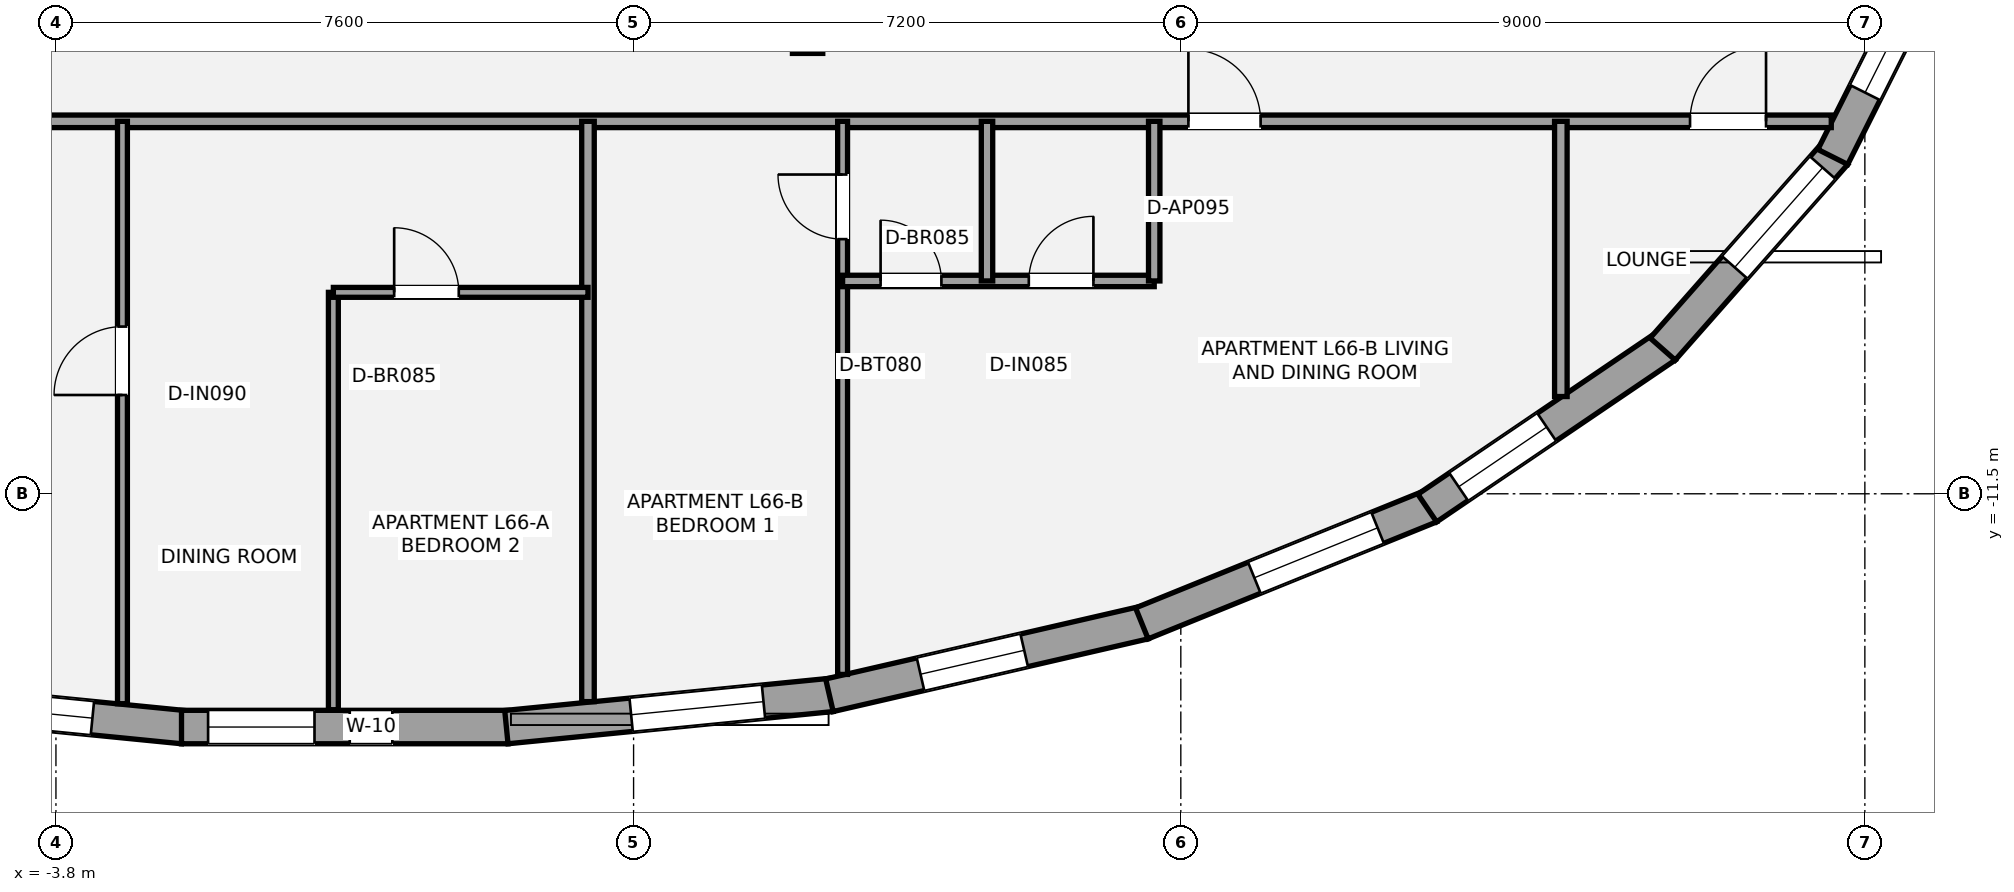
"""IFC4 building model, lengths in metres.
Left out: names, types, materials, properties, quantities, classifications, styles, units other than length and angle.
Written with IfcOpenShell. Run it as: python <this file> out.ifc"""

import sys

from ifc_helpers import new_model, si_unit, direction, frame, frame_2d, origin, origin_2d, place, context, subcontext, project, spatial, rectangle, i_section, extrude, element, fill, save


model = new_model("IFC4")
c1 = context("Model", 3, precision=1e-05, world=origin(), true_north=direction((0.0, 1.0)))
c2 = subcontext(c1, "Body", "Model", "MODEL_VIEW")
j1 = project(units=[si_unit("LENGTHUNIT", "METRE"), si_unit("PLANEANGLEUNIT", "RADIAN")], contexts=[c1])
p1 = place(None, origin())
s1 = spatial("IfcSite", under=j1, at=p1, CompositionType="ELEMENT")
p2 = place(p1, origin())
s2 = spatial("IfcBuilding", under=s1, at=p2, CompositionType="ELEMENT")
p3 = place(p2, frame((0.0, 0.0, 235.2)))
s3 = spatial("IfcBuildingStorey", under=s2, at=p3, CompositionType="ELEMENT", Elevation=235.2)
p4 = place(p3, frame((6.09, -5.513, 0.0), z_axis=(0.0, 0.0, 1.0), x_axis=(1.0, 0.0, 0.0)))
e1 = element("IfcColumn", 1, at=p4, inside=s3, PredefinedType="COLUMN", context=c2, shape_type="SweptSolid", body=[
    extrude(i_section(OverallWidth=0.399, OverallDepth=0.387, WebThickness=0.021, FlangeThickness=0.033, at=origin_2d()), origin(), (0.0, 0.0, 1.0), 3.15),
])
p5 = place(p3, frame((-2.126, -14.57, 0.0), z_axis=(0.0, 0.0, 1.0), x_axis=(-0.995134540264, 0.098525361068, 0.0)))
e2 = element("IfcWall", 2, at=p5, inside=s3, PredefinedType="STANDARD", context=c2, shape_type="SweptSolid", body=[
    extrude(rectangle(XDim=4.299, YDim=0.44, at=frame_2d((2.15, 0.0))), origin(), (0.0, 0.0, 1.0), 2.336),
])
p6 = place(p5, frame((1.2, 0.0, 0.58)))
e3 = element("IfcOpeningElement", 3, at=p6, cuts=e2, PredefinedType="OPENING", context=c2, shape_type="SweptSolid", body=[
    extrude(rectangle(XDim=1.4, YDim=1.55, at=frame_2d((0.7, 0.775))), frame((0.0, 0.23, 0.0), z_axis=(0.0, -1.0, 0.0), x_axis=(1.0, 0.0, 0.0)), (0.0, 0.0, 1.0), 0.46),
])
p7 = place(p3, frame((2.148, -14.569, 0.0), z_axis=(0.0, 0.0, 1.0), x_axis=(-1.0, 0.0, 0.0)))
e4 = element("IfcWall", 4, at=p7, inside=s3, PredefinedType="STANDARD", context=c2, shape_type="SweptSolid", body=[
    extrude(rectangle(XDim=4.296, YDim=0.44, at=frame_2d((2.148, 0.0))), origin(), (0.0, 0.0, 1.0), 2.336),
])
p8 = place(p7, frame((2.546, 0.0, 0.58)))
e5 = element("IfcOpeningElement", 5, at=p8, cuts=e4, PredefinedType="OPENING", context=c2, shape_type="SweptSolid", body=[
    extrude(rectangle(XDim=1.4, YDim=1.55, at=frame_2d((0.7, 0.775))), frame((0.0, 0.23, 0.0), z_axis=(0.0, -1.0, 0.0), x_axis=(1.0, 0.0, 0.0)), (0.0, 0.0, 1.0), 0.46),
])
p9 = place(p7, frame((1.522, 0.0, 0.58)))
e6 = element("IfcOpeningElement", 6, at=p9, cuts=e4, PredefinedType="OPENING", context=c2, shape_type="SweptSolid", body=[
    extrude(rectangle(XDim=0.56, YDim=1.15, at=frame_2d((0.28, 0.575))), frame((0.0, 0.23, 0.0), z_axis=(0.0, -1.0, 0.0), x_axis=(1.0, 0.0, 0.0)), (0.0, 0.0, 1.0), 0.46),
])
p10 = place(p3, frame((6.405, -14.146, 0.0), z_axis=(0.0, 0.0, 1.0), x_axis=(-0.995134540264, -0.098525361068, 0.0)))
e7 = element("IfcWall", 7, at=p10, inside=s3, PredefinedType="STANDARD", context=c2, shape_type="SweptSolid", body=[
    extrude(rectangle(XDim=4.299, YDim=0.44, at=frame_2d((2.15, 0.0))), origin(), (0.0, 0.0, 1.0), 2.336),
])
p11 = place(p10, frame((0.9, 0.0, 0.55)))
e8 = element("IfcOpeningElement", 8, at=p11, cuts=e7, PredefinedType="OPENING", context=c2, shape_type="SweptSolid", body=[
    extrude(rectangle(XDim=1.75, YDim=1.55, at=frame_2d((0.875, 0.775))), frame((0.0, 0.23, 0.0), z_axis=(0.0, -1.0, 0.0), x_axis=(1.0, 0.0, 0.0)), (0.0, 0.0, 1.0), 0.46),
])
p12 = place(p3, frame((10.52, -13.195, 0.0), z_axis=(0.0, 0.0, 1.0), x_axis=(-0.974398936081, -0.224825962391, 0.0)))
e9 = element("IfcWall", 9, at=p12, inside=s3, PredefinedType="STANDARD", context=c2, shape_type="SweptSolid", body=[
    extrude(rectangle(XDim=4.252, YDim=0.44, at=frame_2d((2.126, 0.0))), origin(), (0.0, 0.0, 1.0), 2.336),
])
p13 = place(p12, frame((1.622, 0.0, 0.55)))
e10 = element("IfcOpeningElement", 10, at=p13, cuts=e9, PredefinedType="OPENING", context=c2, shape_type="SweptSolid", body=[
    extrude(rectangle(XDim=1.4, YDim=1.55, at=frame_2d((0.7, 0.775))), frame((0.0, 0.23, 0.0), z_axis=(0.0, -1.0, 0.0), x_axis=(1.0, 0.0, 0.0)), (0.0, 0.0, 1.0), 0.46),
])
p14 = place(p3, frame((14.283, -11.666, 0.0), z_axis=(0.0, 0.0, 1.0), x_axis=(-0.926731976866, -0.375723093586, 0.0)))
e11 = element("IfcWall", 11, at=p14, inside=s3, PredefinedType="STANDARD", context=c2, shape_type="SweptSolid", body=[
    extrude(rectangle(XDim=4.096, YDim=0.44, at=frame_2d((2.048, 0.0))), origin(), (0.0, 0.0, 1.0), 2.336),
])
p15 = place(p14, frame((0.749, 0.0, 0.55)))
e12 = element("IfcOpeningElement", 12, at=p15, cuts=e11, PredefinedType="OPENING", context=c2, shape_type="SweptSolid", body=[
    extrude(rectangle(XDim=1.75, YDim=1.55, at=frame_2d((0.875, 0.775))), frame((0.0, 0.23, 0.0), z_axis=(0.0, -1.0, 0.0), x_axis=(1.0, 0.0, 0.0)), (0.0, 0.0, 1.0), 0.46),
])
p16 = place(p3, frame((17.381, -9.559, 0.0), z_axis=(0.0, 0.0, 1.0), x_axis=(-0.827637036896, -0.561263694851, 0.0)))
e13 = element("IfcWall", 13, at=p16, inside=s3, PredefinedType="STANDARD", context=c2, shape_type="SweptSolid", body=[
    extrude(rectangle(XDim=3.793, YDim=0.44, at=frame_2d((1.896, 0.0))), origin(), (0.0, 0.0, 1.0), 2.336),
])
p17 = place(p16, frame((1.894, 0.0, 0.58)))
e14 = element("IfcOpeningElement", 14, at=p17, cuts=e13, PredefinedType="OPENING", context=c2, shape_type="SweptSolid", body=[
    extrude(rectangle(XDim=1.4, YDim=1.55, at=frame_2d((0.7, 0.775))), frame((0.0, 0.23, 0.0), z_axis=(0.0, -1.0, 0.0), x_axis=(1.0, 0.0, 0.0)), (0.0, 0.0, 1.0), 0.46),
])
p18 = place(p3, frame((19.61, -7.022, 0.0), z_axis=(0.0, 0.0, 1.0), x_axis=(-0.66136043846, -0.750068243855, 0.0)))
e15 = element("IfcWall", 15, at=p18, inside=s3, PredefinedType="STANDARD", context=c2, shape_type="SweptSolid", body=[
    extrude(rectangle(XDim=3.432, YDim=0.44, at=frame_2d((1.716, 0.0))), origin(), (0.0, 0.0, 1.0), 2.336),
])
p19 = place(p18, frame((0.249, 0.0, 0.55)))
e16 = element("IfcOpeningElement", 16, at=p19, cuts=e15, PredefinedType="OPENING", context=c2, shape_type="SweptSolid", body=[
    extrude(rectangle(XDim=1.75, YDim=1.55, at=frame_2d((0.875, 0.775))), frame((0.0, 0.23, 0.0), z_axis=(0.0, -1.0, 0.0), x_axis=(1.0, 0.0, 0.0)), (0.0, 0.0, 1.0), 0.46),
])
p20 = place(p3, frame((20.988, -4.259, 0.0), z_axis=(0.0, 0.0, 1.0), x_axis=(-0.448424724145, -0.893820601002, 0.0)))
e17 = element("IfcWall", 17, at=p20, inside=s3, PredefinedType="STANDARD", context=c2, shape_type="SweptSolid", body=[
    extrude(rectangle(XDim=3.144, YDim=0.44, at=frame_2d((1.572, 0.0))), origin(), (0.0, 0.0, 1.0), 2.336),
])
p21 = place(p20, frame((1.296, 0.0, 0.58)))
e18 = element("IfcOpeningElement", 18, at=p21, cuts=e17, PredefinedType="OPENING", context=c2, shape_type="SweptSolid", body=[
    extrude(rectangle(XDim=0.9, YDim=1.35, at=frame_2d((0.45, 0.675))), frame((0.0, 0.23, 0.0), z_axis=(0.0, -1.0, 0.0), x_axis=(1.0, 0.0, 0.0)), (0.0, 0.0, 1.0), 0.46),
])
p22 = place(p3, frame((-19.558, -6.6, 0.0), z_axis=(0.0, 0.0, 1.0), x_axis=(1.0, 0.0, 0.0)))
e19 = element("IfcWall", 19, at=p22, inside=s3, PredefinedType="PARTITIONING", context=c2, shape_type="SweptSolid", body=[
    extrude(rectangle(XDim=39.116, YDim=0.165, at=frame_2d((19.558, 0.0))), origin(), (0.0, 0.0, 1.0), 2.423),
])
p23 = place(p22, frame((1.083, 0.0, 0.0)))
e20 = element("IfcOpeningElement", 20, at=p23, cuts=e19, PredefinedType="OPENING", context=c2, shape_type="SweptSolid", body=[
    extrude(rectangle(XDim=1.0, YDim=2.15, at=frame_2d((0.5, 1.075))), frame((0.0, 0.093, 0.0), z_axis=(0.0, -1.0, 0.0), x_axis=(1.0, 0.0, 0.0)), (0.0, 0.0, 1.0), 0.185),
])
p24 = place(p22, frame((37.258, 0.0, 0.0)))
e21 = element("IfcOpeningElement", 21, at=p24, cuts=e19, PredefinedType="OPENING", context=c2, shape_type="SweptSolid", body=[
    extrude(rectangle(XDim=1.0, YDim=2.15, at=frame_2d((0.5, 1.075))), frame((0.0, 0.093, 0.0), z_axis=(0.0, -1.0, 0.0), x_axis=(1.0, 0.0, 0.0)), (0.0, 0.0, 1.0), 0.185),
])
p25 = place(p22, frame((13.868, 0.0, 0.0)))
e22 = element("IfcOpeningElement", 22, at=p25, cuts=e19, PredefinedType="OPENING", context=c2, shape_type="SweptSolid", body=[
    extrude(rectangle(XDim=0.95, YDim=2.15, at=frame_2d((0.475, 1.075))), frame((0.0, 0.093, 0.0), z_axis=(0.0, -1.0, 0.0), x_axis=(1.0, 0.0, 0.0)), (0.0, 0.0, 1.0), 0.185),
])
p26 = place(p22, frame((30.658, 0.0, 0.0)))
e23 = element("IfcOpeningElement", 23, at=p26, cuts=e19, PredefinedType="OPENING", context=c2, shape_type="SweptSolid", body=[
    extrude(rectangle(XDim=0.95, YDim=2.15, at=frame_2d((0.475, 1.075))), frame((0.0, 0.093, 0.0), z_axis=(0.0, -1.0, 0.0), x_axis=(1.0, 0.0, 0.0)), (0.0, 0.0, 1.0), 0.185),
])
p27 = place(p3, frame((16.0, -10.221, 0.0), z_axis=(0.0, 0.0, 1.0), x_axis=(0.0, 1.0, 0.0)))
e24 = element("IfcWall", 24, at=p27, inside=s3, PredefinedType="PARTITIONING", context=c2, shape_type="SweptSolid", body=[
    extrude(rectangle(XDim=3.621, YDim=0.165, at=frame_2d((1.81, 0.0))), origin(), (0.0, 0.0, 1.0), 2.423),
])
p28 = place(p3, frame((3.2, -14.234, 0.0), z_axis=(0.0, 0.0, 1.0), x_axis=(0.0, 1.0, 0.0)))
e25 = element("IfcWall", 25, at=p28, inside=s3, PredefinedType="PARTITIONING", context=c2, shape_type="SweptSolid", body=[
    extrude(rectangle(XDim=7.634, YDim=0.165, at=frame_2d((3.817, 0.0))), origin(), (0.0, 0.0, 1.0), 2.423),
])
p29 = place(p3, frame((-0.15, -14.341, 0.0), z_axis=(0.0, 0.0, 1.0), x_axis=(0.0, 1.0, 0.0)))
e26 = element("IfcWall", 26, at=p29, inside=s3, PredefinedType="PARTITIONING", context=c2, shape_type="SweptSolid", body=[
    extrude(rectangle(XDim=5.491, YDim=0.13, at=frame_2d((2.745, 0.0))), origin(), (0.0, 0.0, 1.0), 2.423),
])
p30 = place(p3, frame((-0.15, -8.85, 0.0), z_axis=(0.0, 0.0, 1.0), x_axis=(1.0, 0.0, 0.0)))
e27 = element("IfcWall", 27, at=p30, inside=s3, PredefinedType="PARTITIONING", context=c2, shape_type="SweptSolid", body=[
    extrude(rectangle(XDim=3.35, YDim=0.13, at=frame_2d((1.675, 0.0))), origin(), (0.0, 0.0, 1.0), 2.97),
])
p31 = place(p30, frame((0.8, 0.0, 0.0)))
e28 = element("IfcOpeningElement", 28, at=p31, cuts=e27, PredefinedType="OPENING", context=c2, shape_type="SweptSolid", body=[
    extrude(rectangle(XDim=0.85, YDim=2.1, at=frame_2d((0.425, 1.05))), frame((0.0, 0.075, 0.0), z_axis=(0.0, -1.0, 0.0), x_axis=(1.0, 0.0, 0.0)), (0.0, 0.0, 1.0), 0.15),
])
p32 = place(p3, frame((-2.925, -14.262, 0.0), z_axis=(0.0, 0.0, 1.0), x_axis=(0.0, 1.0, 0.0)))
e29 = element("IfcWall", 29, at=p32, inside=s3, PredefinedType="PARTITIONING", context=c2, shape_type="SweptSolid", body=[
    extrude(rectangle(XDim=7.662, YDim=0.13, at=frame_2d((3.831, 0.0))), origin(), (0.0, 0.0, 1.0), 2.423),
])
p33 = place(p32, frame((4.061, 0.0, 0.0)))
e30 = element("IfcOpeningElement", 30, at=p33, cuts=e29, PredefinedType="OPENING", context=c2, shape_type="SweptSolid", body=[
    extrude(rectangle(XDim=0.9, YDim=2.1, at=frame_2d((0.45, 1.05))), frame((0.0, 0.075, 0.0), z_axis=(0.0, -1.0, 0.0), x_axis=(1.0, 0.0, 0.0)), (0.0, 0.0, 1.0), 0.15),
])
p34 = place(p3, frame((6.55, -13.877, 0.0), z_axis=(0.0, 0.0, 1.0), x_axis=(0.0, 1.0, 0.0)))
e31 = element("IfcWall", 31, at=p34, inside=s3, PredefinedType="PARTITIONING", context=c2, shape_type="SweptSolid", body=[
    extrude(rectangle(XDim=7.277, YDim=0.13, at=frame_2d((3.638, 0.0))), origin(), (0.0, 0.0, 1.0), 2.97),
])
p35 = place(p34, frame((5.727, 0.0, 0.0)))
e32 = element("IfcOpeningElement", 32, at=p35, cuts=e31, PredefinedType="OPENING", context=c2, shape_type="SweptSolid", body=[
    extrude(rectangle(XDim=0.85, YDim=2.1, at=frame_2d((0.425, 1.05))), frame((0.0, 0.075, 0.0), z_axis=(0.0, -1.0, 0.0), x_axis=(1.0, 0.0, 0.0)), (0.0, 0.0, 1.0), 0.15),
])
p36 = place(p3, frame((6.55, -8.7, 0.0), z_axis=(0.0, 0.0, 1.0), x_axis=(1.0, 0.0, 0.0)))
e33 = element("IfcWall", 33, at=p36, inside=s3, PredefinedType="PLUMBINGWALL", context=c2, shape_type="SweptSolid", body=[
    extrude(rectangle(XDim=4.1, YDim=0.15, at=frame_2d((2.05, 0.0))), origin(), (0.0, 0.0, 1.0), 2.423),
])
p37 = place(p36, frame((0.5, 0.0, 0.0)))
e34 = element("IfcOpeningElement", 34, at=p37, cuts=e33, PredefinedType="OPENING", context=c2, shape_type="SweptSolid", body=[
    extrude(rectangle(XDim=0.8, YDim=2.1, at=frame_2d((0.4, 1.05))), frame((0.0, 0.085, 0.0), z_axis=(0.0, -1.0, 0.0), x_axis=(1.0, 0.0, 0.0)), (0.0, 0.0, 1.0), 0.17),
])
p38 = place(p36, frame((2.45, 0.0, 0.0)))
e35 = element("IfcOpeningElement", 35, at=p38, cuts=e33, PredefinedType="OPENING", context=c2, shape_type="SweptSolid", body=[
    extrude(rectangle(XDim=0.85, YDim=2.1, at=frame_2d((0.425, 1.05))), frame((0.0, 0.085, 0.0), z_axis=(0.0, -1.0, 0.0), x_axis=(1.0, 0.0, 0.0)), (0.0, 0.0, 1.0), 0.17),
])
p39 = place(p3, frame((8.45, -8.7, 0.0), z_axis=(0.0, 0.0, 1.0), x_axis=(0.0, 1.0, 0.0)))
e36 = element("IfcWall", 36, at=p39, inside=s3, PredefinedType="PLUMBINGWALL", context=c2, shape_type="SweptSolid", body=[
    extrude(rectangle(XDim=2.1, YDim=0.15, at=frame_2d((1.05, 0.0))), origin(), (0.0, 0.0, 1.0), 2.97),
])
p40 = place(p3, frame((10.65, -8.7, 0.0), z_axis=(0.0, 0.0, 1.0), x_axis=(0.0, 1.0, 0.0)))
e37 = element("IfcWall", 37, at=p40, inside=s3, PredefinedType="PLUMBINGWALL", context=c2, shape_type="SweptSolid", body=[
    extrude(rectangle(XDim=2.1, YDim=0.15, at=frame_2d((1.05, 0.0))), origin(), (0.0, 0.0, 1.0), 2.423),
])
p41 = place(p6, origin())
e38 = element("IfcWindow", 38, at=p41, inside=s3, PartitioningType="SINGLE_PANEL", PredefinedType="WINDOW", context=c2, shape_type="SweptSolid", body=[
    extrude(rectangle(XDim=1.4, YDim=1.55, at=frame_2d((0.7, 0.775))), frame((0.0, -0.01, 0.0), z_axis=(0.0, -1.0, 0.0), x_axis=(1.0, 0.0, 0.0)), (0.0, 0.0, 1.0), 0.06),
])
fill(e3, e38)
p42 = place(p8, origin())
e39 = element("IfcWindow", 39, at=p42, inside=s3, PartitioningType="SINGLE_PANEL", PredefinedType="WINDOW", context=c2, shape_type="SweptSolid", body=[
    extrude(rectangle(XDim=1.4, YDim=1.55, at=frame_2d((0.7, 0.775))), frame((0.0, -0.01, 0.0), z_axis=(0.0, -1.0, 0.0), x_axis=(1.0, 0.0, 0.0)), (0.0, 0.0, 1.0), 0.06),
])
fill(e5, e39)
p43 = place(p11, origin())
e40 = element("IfcWindow", 40, at=p43, inside=s3, PartitioningType="SINGLE_PANEL", PredefinedType="WINDOW", context=c2, shape_type="SweptSolid", body=[
    extrude(rectangle(XDim=1.75, YDim=1.55, at=frame_2d((0.875, 0.775))), frame((0.0, -0.01, 0.0), z_axis=(0.0, -1.0, 0.0), x_axis=(1.0, 0.0, 0.0)), (0.0, 0.0, 1.0), 0.06),
])
fill(e8, e40)
p44 = place(p13, origin())
e41 = element("IfcWindow", 41, at=p44, inside=s3, PartitioningType="SINGLE_PANEL", PredefinedType="WINDOW", context=c2, shape_type="SweptSolid", body=[
    extrude(rectangle(XDim=1.4, YDim=1.55, at=frame_2d((0.7, 0.775))), frame((0.0, -0.01, 0.0), z_axis=(0.0, -1.0, 0.0), x_axis=(1.0, 0.0, 0.0)), (0.0, 0.0, 1.0), 0.06),
])
fill(e10, e41)
p45 = place(p15, origin())
e42 = element("IfcWindow", 42, at=p45, inside=s3, PartitioningType="SINGLE_PANEL", PredefinedType="WINDOW", context=c2, shape_type="SweptSolid", body=[
    extrude(rectangle(XDim=1.75, YDim=1.55, at=frame_2d((0.875, 0.775))), frame((0.0, -0.01, 0.0), z_axis=(0.0, -1.0, 0.0), x_axis=(1.0, 0.0, 0.0)), (0.0, 0.0, 1.0), 0.06),
])
fill(e12, e42)
p46 = place(p17, origin())
e43 = element("IfcWindow", 43, at=p46, inside=s3, PartitioningType="SINGLE_PANEL", PredefinedType="WINDOW", context=c2, shape_type="SweptSolid", body=[
    extrude(rectangle(XDim=1.4, YDim=1.55, at=frame_2d((0.7, 0.775))), frame((0.0, -0.01, 0.0), z_axis=(0.0, -1.0, 0.0), x_axis=(1.0, 0.0, 0.0)), (0.0, 0.0, 1.0), 0.06),
])
fill(e14, e43)
p47 = place(p19, origin())
e44 = element("IfcWindow", 44, at=p47, inside=s3, PartitioningType="SINGLE_PANEL", PredefinedType="WINDOW", context=c2, shape_type="SweptSolid", body=[
    extrude(rectangle(XDim=1.75, YDim=1.55, at=frame_2d((0.875, 0.775))), frame((0.0, -0.01, 0.0), z_axis=(0.0, -1.0, 0.0), x_axis=(1.0, 0.0, 0.0)), (0.0, 0.0, 1.0), 0.06),
])
fill(e16, e44)
p48 = place(p21, origin())
e45 = element("IfcWindow", 45, at=p48, inside=s3, PartitioningType="SINGLE_PANEL", PredefinedType="WINDOW", context=c2, shape_type="SweptSolid", body=[
    extrude(rectangle(XDim=0.9, YDim=1.35, at=frame_2d((0.45, 0.675))), frame((0.0, -0.01, 0.0), z_axis=(0.0, -1.0, 0.0), x_axis=(1.0, 0.0, 0.0)), (0.0, 0.0, 1.0), 0.06),
])
fill(e18, e45)
p49 = place(p9, origin())
e46 = element("IfcWindow", 46, at=p49, inside=s3, PartitioningType="SINGLE_PANEL", PredefinedType="WINDOW", context=c2, shape_type="SweptSolid", body=[
    extrude(rectangle(XDim=0.56, YDim=1.15, at=frame_2d((0.28, 0.575))), frame((0.0, -0.01, 0.0), z_axis=(0.0, -1.0, 0.0), x_axis=(1.0, 0.0, 0.0)), (0.0, 0.0, 1.0), 0.06),
])
fill(e6, e46)
p50 = place(p24, origin())
e47 = element("IfcDoor", 47, at=p50, inside=s3, OperationType="SINGLE_SWING_RIGHT", PredefinedType="DOOR", context=c2, shape_type="SweptSolid", body=[
    extrude(rectangle(XDim=1.0, YDim=2.15, at=frame_2d((0.5, 1.075))), frame((0.0, 0.025, 0.0), z_axis=(0.0, -1.0, 0.0), x_axis=(1.0, 0.0, 0.0)), (0.0, 0.0, 1.0), 0.05),
])
fill(e21, e47)
p51 = place(p31, origin())
e48 = element("IfcDoor", 48, at=p51, inside=s3, OperationType="SINGLE_SWING_LEFT", PredefinedType="DOOR", context=c2, shape_type="SweptSolid", body=[
    extrude(rectangle(XDim=0.85, YDim=2.1, at=frame_2d((0.425, 1.05))), frame((0.0, 0.025, 0.0), z_axis=(0.0, -1.0, 0.0), x_axis=(1.0, 0.0, 0.0)), (0.0, 0.0, 1.0), 0.05),
])
fill(e28, e48)
p52 = place(p33, origin())
e49 = element("IfcDoor", 49, at=p52, inside=s3, OperationType="SINGLE_SWING_LEFT", PredefinedType="DOOR", context=c2, shape_type="SweptSolid", body=[
    extrude(rectangle(XDim=0.9, YDim=2.1, at=frame_2d((0.45, 1.05))), frame((0.0, 0.025, 0.0), z_axis=(0.0, -1.0, 0.0), x_axis=(1.0, 0.0, 0.0)), (0.0, 0.0, 1.0), 0.05),
])
fill(e30, e49)
p53 = place(p35, origin())
e50 = element("IfcDoor", 50, at=p53, inside=s3, OperationType="SINGLE_SWING_RIGHT", PredefinedType="DOOR", context=c2, shape_type="SweptSolid", body=[
    extrude(rectangle(XDim=0.85, YDim=2.1, at=frame_2d((0.425, 1.05))), frame((0.0, 0.025, 0.0), z_axis=(0.0, -1.0, 0.0), x_axis=(1.0, 0.0, 0.0)), (0.0, 0.0, 1.0), 0.05),
])
fill(e32, e50)
p54 = place(p37, origin())
e51 = element("IfcDoor", 51, at=p54, inside=s3, OperationType="SINGLE_SWING_LEFT", PredefinedType="DOOR", context=c2, shape_type="SweptSolid", body=[
    extrude(rectangle(XDim=0.8, YDim=2.1, at=frame_2d((0.4, 1.05))), frame((0.0, 0.025, 0.0), z_axis=(0.0, -1.0, 0.0), x_axis=(1.0, 0.0, 0.0)), (0.0, 0.0, 1.0), 0.05),
])
fill(e34, e51)
p55 = place(p38, origin())
e52 = element("IfcDoor", 52, at=p55, inside=s3, OperationType="SINGLE_SWING_RIGHT", PredefinedType="DOOR", context=c2, shape_type="SweptSolid", body=[
    extrude(rectangle(XDim=0.85, YDim=2.1, at=frame_2d((0.425, 1.05))), frame((0.0, 0.025, 0.0), z_axis=(0.0, -1.0, 0.0), x_axis=(1.0, 0.0, 0.0)), (0.0, 0.0, 1.0), 0.05),
])
fill(e35, e52)
p56 = place(p26, origin())
e53 = element("IfcDoor", 53, at=p56, inside=s3, OperationType="SINGLE_SWING_LEFT", PredefinedType="DOOR", context=c2, shape_type="SweptSolid", body=[
    extrude(rectangle(XDim=0.95, YDim=2.15, at=frame_2d((0.475, 1.075))), frame((0.0, 0.025, 0.0), z_axis=(0.0, -1.0, 0.0), x_axis=(1.0, 0.0, 0.0)), (0.0, 0.0, 1.0), 0.05),
])
fill(e23, e53)
save(model, sys.argv[1])
